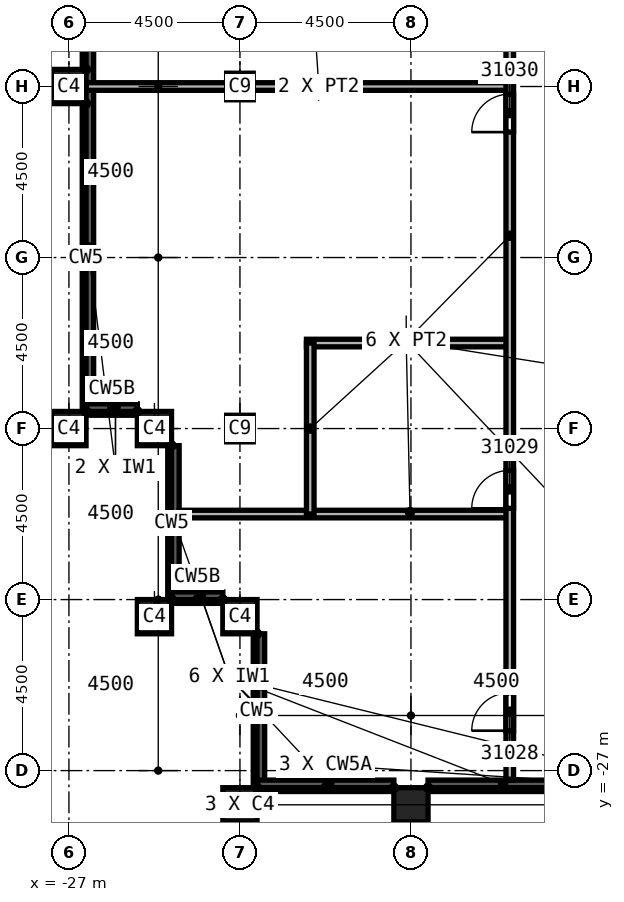
"""IFC4 building model, lengths in metres.
Left out: names, types, materials, properties, quantities, classifications, styles, units other than length and angle.
Written with IfcOpenShell. Run it as: python <this file> out.ifc"""

import sys

from ifc_helpers import new_model, si_unit, direction, frame, frame_2d, origin, origin_2d, place, context, subcontext, project, spatial, rectangle, extrude, element, fill, save


model = new_model("IFC4")
c1 = context("Model", 3, precision=1e-05, world=origin(), true_north=direction((0.0, 1.0)))
c2 = subcontext(c1, "Body", "Model", "MODEL_VIEW")
j1 = project(units=[si_unit("LENGTHUNIT", "METRE"), si_unit("PLANEANGLEUNIT", "RADIAN")], contexts=[c1])
p1 = place(None, origin())
s1 = spatial("IfcSite", under=j1, at=p1, CompositionType="ELEMENT")
p2 = place(p1, origin())
s2 = spatial("IfcBuilding", under=s1, at=p2, CompositionType="ELEMENT")
p3 = place(p2, frame((0.0, 0.0, 350.0)))
s3 = spatial("IfcBuildingStorey", under=s2, at=p3, CompositionType="ELEMENT", Elevation=350.0)
for number, where, z_axis, x_axis in (
    (1, (-22.5, -9.0, 0.0), (0.0, 0.0, 1.0), (1.0, 0.0, 0.0)),
    (2, (-22.5, -18.0, 0.0), (0.0, 0.0, 1.0), (1.0, 0.0, 0.0)),
):
    element("IfcColumn", number, at=place(p3, frame(where, z_axis=z_axis, x_axis=x_axis)), inside=s3, PredefinedType="COLUMN", context=c2, shape_type="SweptSolid", body=[
        extrude(rectangle(XDim=0.7, YDim=0.7, at=origin_2d()), origin(), (0.0, 0.0, 1.0), 5.6),
    ])
for number, where, z_axis, x_axis in (
    (3, (-18.0, -27.9, 0.0), (0.0, 0.0, 1.0), (1.0, 0.0, 0.0)),
    (4, (-22.5, -27.9, 0.0), (0.0, 0.0, 1.0), (1.0, 0.0, 0.0)),
    (5, (-27.0, -9.0, 0.0), (0.0, 0.0, 1.0), (0.0, 1.0, 0.0)),
    (6, (-27.0, -18.0, 0.0), (0.0, 0.0, 1.0), (0.0, 1.0, 0.0)),
    (7, (-22.5, -22.95, 0.0), (0.0, 0.0, 1.0), (1.0, 0.0, 0.0)),
    (8, (-24.75, -22.95, 0.0), (0.0, 0.0, 1.0), (1.0, 0.0, 0.0)),
    (9, (-24.75, -18.0, 0.0), (0.0, 0.0, 1.0), (1.0, 0.0, 0.0)),
):
    element("IfcColumn", number, at=place(p3, frame(where, z_axis=z_axis, x_axis=x_axis)), inside=s3, PredefinedType="COLUMN", context=c2, shape_type="SweptSolid", body=[
        extrude(rectangle(XDim=0.9, YDim=0.9, at=origin_2d()), origin(), (0.0, 0.0, 1.0), 5.6),
    ])
p4 = place(p3, frame((-26.5, -0.05, 0.0), z_axis=(0.0, 0.0, 1.0), x_axis=(0.0, -1.0, 0.0)))
e10 = element("IfcWall", 10, at=p4, inside=s3, PredefinedType="SOLIDWALL", context=c2, shape_type="SweptSolid", body=[
    extrude(rectangle(XDim=8.9, YDim=0.3, at=frame_2d((4.45, 0.0))), origin(), (0.0, 0.0, 1.0), 1.1),
])
p5 = place(p3, frame((-26.5, -9.05, 0.0), z_axis=(0.0, 0.0, 1.0), x_axis=(0.0, -1.0, 0.0)))
e11 = element("IfcWall", 11, at=p5, inside=s3, PredefinedType="SOLIDWALL", context=c2, shape_type="SweptSolid", body=[
    extrude(rectangle(XDim=8.5, YDim=0.3, at=frame_2d((4.25, 0.0))), origin(), (0.0, 0.0, 1.0), 1.1),
])
p6 = place(p3, frame((-26.55, -17.5, 0.0), z_axis=(0.0, 0.0, 1.0), x_axis=(1.0, 0.0, 0.0)))
e12 = element("IfcWall", 12, at=p6, inside=s3, PredefinedType="SOLIDWALL", context=c2, shape_type="SweptSolid", body=[
    extrude(rectangle(XDim=1.35, YDim=0.3, at=frame_2d((0.675, 0.0))), origin(), (0.0, 0.0, 1.0), 1.1),
])
p7 = place(p3, frame((-24.25, -18.45, 0.0), z_axis=(0.0, 0.0, 1.0), x_axis=(0.0, -1.0, 0.0)))
e13 = element("IfcWall", 13, at=p7, inside=s3, PredefinedType="SOLIDWALL", context=c2, shape_type="SweptSolid", body=[
    extrude(rectangle(XDim=4.05, YDim=0.3, at=frame_2d((2.025, 0.0))), origin(), (0.0, 0.0, 1.0), 1.1),
])
p8 = place(p3, frame((-24.3, -22.45, 0.0), z_axis=(0.0, 0.0, 1.0), x_axis=(1.0, 0.0, 0.0)))
e14 = element("IfcWall", 14, at=p8, inside=s3, PredefinedType="SOLIDWALL", context=c2, shape_type="SweptSolid", body=[
    extrude(rectangle(XDim=1.35, YDim=0.3, at=frame_2d((0.675, 0.0))), origin(), (0.0, 0.0, 1.0), 1.1),
])
p9 = place(p3, frame((-22.0, -23.4, 0.0), z_axis=(0.0, 0.0, 1.0), x_axis=(0.0, -1.0, 0.0)))
e15 = element("IfcWall", 15, at=p9, inside=s3, PredefinedType="SOLIDWALL", context=c2, shape_type="SweptSolid", body=[
    extrude(rectangle(XDim=4.05, YDim=0.3, at=frame_2d((2.025, 0.0))), origin(), (0.0, 0.0, 1.0), 1.1),
])
p10 = place(p3, frame((-22.05, -27.4, 0.0), z_axis=(0.0, 0.0, 1.0), x_axis=(1.0, 0.0, 0.0)))
e16 = element("IfcWall", 16, at=p10, inside=s3, PredefinedType="SOLIDWALL", context=c2, shape_type="SweptSolid", body=[
    extrude(rectangle(XDim=3.6, YDim=0.3, at=frame_2d((1.8, 0.0))), origin(), (0.0, 0.0, 1.0), 1.1),
])
p11 = place(p3, frame((-17.55, -27.4, 0.0), z_axis=(0.0, 0.0, 1.0), x_axis=(1.0, 0.0, 0.0)))
e17 = element("IfcWall", 17, at=p11, inside=s3, PredefinedType="SOLIDWALL", context=c2, shape_type="SweptSolid", body=[
    extrude(rectangle(XDim=4.0, YDim=0.3, at=frame_2d((2.0, 0.0))), origin(), (0.0, 0.0, 1.0), 1.1),
])
p12 = place(p3, frame((-26.55, -9.0, 0.0), z_axis=(0.0, 0.0, 1.0), x_axis=(1.0, 0.0, 0.0)))
e18 = element("IfcWall", 18, at=p12, inside=s3, PredefinedType="PARTITIONING", context=c2, shape_type="SweptSolid", body=[
    extrude(rectangle(XDim=11.15, YDim=0.2, at=frame_2d((5.575, 0.0))), origin(), (0.0, 0.0, 1.0), 5.6),
])
p13 = place(p3, frame((-24.1, -20.25, 0.0), z_axis=(0.0, 0.0, 1.0), x_axis=(1.0, 0.0, 0.0)))
e19 = element("IfcWall", 19, at=p13, inside=s3, PredefinedType="PARTITIONING", context=c2, shape_type="SweptSolid", body=[
    extrude(rectangle(XDim=8.7, YDim=0.2, at=frame_2d((4.35, 0.0))), origin(), (0.0, 0.0, 1.0), 5.6),
])
p14 = place(p3, frame((-20.75, -15.75, 0.0), z_axis=(0.0, 0.0, 1.0), x_axis=(1.0, 0.0, 0.0)))
e20 = element("IfcWall", 20, at=p14, inside=s3, PredefinedType="PARTITIONING", context=c2, shape_type="SweptSolid", body=[
    extrude(rectangle(XDim=5.35, YDim=0.2, at=frame_2d((2.675, 0.0))), origin(), (0.0, 0.0, 1.0), 5.6),
])
p15 = place(p3, frame((-20.65, -20.25, 0.0), z_axis=(0.0, 0.0, 1.0), x_axis=(0.0, 1.0, 0.0)))
e21 = element("IfcWall", 21, at=p15, inside=s3, PredefinedType="PARTITIONING", context=c2, shape_type="SweptSolid", body=[
    extrude(rectangle(XDim=4.5, YDim=0.2, at=frame_2d((2.25, 0.0))), origin(), (0.0, 0.0, 1.0), 5.6),
])
p16 = place(p3, frame((-15.4, -27.25, 0.0), z_axis=(0.0, 0.0, 1.0), x_axis=(0.0, 1.0, 0.0)))
e22 = element("IfcWall", 22, at=p16, inside=s3, PredefinedType="PARTITIONING", context=c2, shape_type="SweptSolid", body=[
    extrude(rectangle(XDim=40.85, YDim=0.2, at=frame_2d((20.425, 0.0))), origin(), (0.0, 0.0, 1.0), 5.6),
])
p17 = place(p16, frame((29.05, 0.0, 0.0)))
e23 = element("IfcOpeningElement", 23, at=p17, cuts=e22, PredefinedType="OPENING", context=c2, shape_type="SweptSolid", body=[
    extrude(rectangle(XDim=1.0, YDim=2.1, at=frame_2d((0.5, 1.05))), frame((0.0, 0.1, 0.0), z_axis=(0.0, -1.0, 0.0), x_axis=(1.0, 0.0, 0.0)), (0.0, 0.0, 1.0), 0.2),
])
p18 = place(p16, frame((33.7, 0.0, 0.0)))
e24 = element("IfcOpeningElement", 24, at=p18, cuts=e22, PredefinedType="OPENING", context=c2, shape_type="SweptSolid", body=[
    extrude(rectangle(XDim=1.0, YDim=2.1, at=frame_2d((0.5, 1.05))), frame((0.0, 0.1, 0.0), z_axis=(0.0, -1.0, 0.0), x_axis=(1.0, 0.0, 0.0)), (0.0, 0.0, 1.0), 0.2),
])
p19 = place(p16, frame((1.3, 0.0, 0.0)))
e25 = element("IfcOpeningElement", 25, at=p19, cuts=e22, PredefinedType="OPENING", context=c2, shape_type="SweptSolid", body=[
    extrude(rectangle(XDim=1.0, YDim=2.1, at=frame_2d((0.5, 1.05))), frame((0.0, 0.1, 0.0), z_axis=(0.0, -1.0, 0.0), x_axis=(1.0, 0.0, 0.0)), (0.0, 0.0, 1.0), 0.2),
])
p20 = place(p16, frame((7.15, 0.0, 0.0)))
e26 = element("IfcOpeningElement", 26, at=p20, cuts=e22, PredefinedType="OPENING", context=c2, shape_type="SweptSolid", body=[
    extrude(rectangle(XDim=1.0, YDim=2.1, at=frame_2d((0.5, 1.05))), frame((0.0, 0.1, 0.0), z_axis=(0.0, -1.0, 0.0), x_axis=(1.0, 0.0, 0.0)), (0.0, 0.0, 1.0), 0.2),
])
p21 = place(p16, frame((17.05, 0.0, 0.0)))
e27 = element("IfcOpeningElement", 27, at=p21, cuts=e22, PredefinedType="OPENING", context=c2, shape_type="SweptSolid", body=[
    extrude(rectangle(XDim=1.0, YDim=2.1, at=frame_2d((0.5, 1.05))), frame((0.0, 0.1, 0.0), z_axis=(0.0, -1.0, 0.0), x_axis=(1.0, 0.0, 0.0)), (0.0, 0.0, 1.0), 0.2),
])
p22 = place(p16, frame((24.1, 0.0, 0.0)))
e28 = element("IfcOpeningElement", 28, at=p22, cuts=e22, PredefinedType="OPENING", context=c2, shape_type="SweptSolid", body=[
    extrude(rectangle(XDim=1.0, YDim=2.1, at=frame_2d((0.5, 1.05))), frame((0.0, 0.1, 0.0), z_axis=(0.0, -1.0, 0.0), x_axis=(1.0, 0.0, 0.0)), (0.0, 0.0, 1.0), 0.2),
])
p23 = place(p19, origin())
e29 = element("IfcDoor", 29, at=p23, inside=s3, OperationType="SINGLE_SWING_LEFT", PredefinedType="DOOR", context=c2, shape_type="SweptSolid", body=[
    extrude(rectangle(XDim=1.0, YDim=2.1, at=frame_2d((0.5, 1.05))), frame((0.0, 0.025, 0.0), z_axis=(0.0, -1.0, 0.0), x_axis=(1.0, 0.0, 0.0)), (0.0, 0.0, 1.0), 0.05),
])
fill(e25, e29)
p24 = place(p20, origin())
e30 = element("IfcDoor", 30, at=p24, inside=s3, OperationType="SINGLE_SWING_RIGHT", PredefinedType="DOOR", context=c2, shape_type="SweptSolid", body=[
    extrude(rectangle(XDim=1.0, YDim=2.1, at=frame_2d((0.5, 1.05))), frame((0.0, 0.025, 0.0), z_axis=(0.0, -1.0, 0.0), x_axis=(1.0, 0.0, 0.0)), (0.0, 0.0, 1.0), 0.05),
])
fill(e26, e30)
p25 = place(p21, origin())
e31 = element("IfcDoor", 31, at=p25, inside=s3, OperationType="SINGLE_SWING_LEFT", PredefinedType="DOOR", context=c2, shape_type="SweptSolid", body=[
    extrude(rectangle(XDim=1.0, YDim=2.1, at=frame_2d((0.5, 1.05))), frame((0.0, 0.025, 0.0), z_axis=(0.0, -1.0, 0.0), x_axis=(1.0, 0.0, 0.0)), (0.0, 0.0, 1.0), 0.05),
])
fill(e27, e31)
save(model, sys.argv[1])
